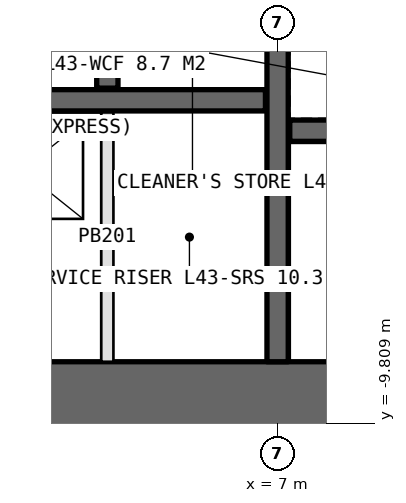
"""IFC4 building model, lengths in metres.
Left out: names, types, materials, properties, quantities, classifications, styles, units other than length and angle.
Written with IfcOpenShell. Run it as: python <this file> out.ifc"""

import sys

from ifc_helpers import new_model, si_unit, direction, frame, frame_2d, origin, place, context, subcontext, project, spatial, rectangle, extrude, element, save


model = new_model("IFC4")
c1 = context("Model", 3, precision=1e-05, world=origin(), true_north=direction((0.0, 1.0)))
c2 = subcontext(c1, "Body", "Model", "MODEL_VIEW")
j1 = project(units=[si_unit("LENGTHUNIT", "METRE"), si_unit("PLANEANGLEUNIT", "RADIAN")], contexts=[c1])
p1 = place(None, origin())
s1 = spatial("IfcSite", under=j1, at=p1, CompositionType="ELEMENT")
p2 = place(p1, origin())
s2 = spatial("IfcBuilding", under=s1, at=p2, CompositionType="ELEMENT")
p3 = place(p2, frame((0.0, 0.0, 199.0)))
s3 = spatial("IfcBuildingStorey", under=s2, at=p3, CompositionType="ELEMENT", Elevation=199.0)
p4 = place(p3, frame((-14.0, -9.4, 0.0), z_axis=(0.0, 0.0, 1.0), x_axis=(1.0, 0.0, 0.0)))
e1 = element("IfcWall", 1, at=p4, inside=s3, PredefinedType="SHEAR", context=c2, shape_type="SweptSolid", body=[
    extrude(rectangle(XDim=28.0, YDim=1.2, at=frame_2d((14.0, 0.0))), origin(), (0.0, 0.0, 1.0), 4.2),
])
p5 = place(p4, frame((22.9, 0.0, 0.0)))
e2 = element("IfcOpeningElement", 2, at=p5, cuts=e1, PredefinedType="OPENING", context=c2, shape_type="SweptSolid", body=[
    extrude(rectangle(XDim=2.2, YDim=2.7, at=frame_2d((1.1, 1.35))), frame((0.0, 0.61, 0.0), z_axis=(0.0, -1.0, 0.0), x_axis=(1.0, 0.0, 0.0)), (0.0, 0.0, 1.0), 1.22),
])
p6 = place(p3, frame((7.0, -8.8, 0.0), z_axis=(0.0, 0.0, 1.0), x_axis=(0.0, 1.0, 0.0)))
e3 = element("IfcWall", 3, at=p6, inside=s3, PredefinedType="SHEAR", context=c2, shape_type="SweptSolid", body=[
    extrude(rectangle(XDim=17.6, YDim=0.35, at=frame_2d((8.8, 0.0))), origin(), (0.0, 0.0, 1.0), 4.2),
])
p7 = place(p6, frame((7.9, 0.0, 0.0)))
e4 = element("IfcOpeningElement", 4, at=p7, cuts=e3, PredefinedType="OPENING", context=c2, shape_type="SweptSolid", body=[
    extrude(rectangle(XDim=1.8, YDim=2.4, at=frame_2d((0.9, 1.2))), frame((0.0, 0.185, 0.0), z_axis=(0.0, -1.0, 0.0), x_axis=(1.0, 0.0, 0.0)), (0.0, 0.0, 1.0), 0.37),
])
p8 = place(p3, frame((-6.8, -4.5, 0.0), z_axis=(0.0, 0.0, 1.0), x_axis=(1.0, 0.0, 0.0)))
e5 = element("IfcWall", 5, at=p8, inside=s3, PredefinedType="SHEAR", context=c2, shape_type="SweptSolid", body=[
    extrude(rectangle(XDim=13.6, YDim=0.35, at=frame_2d((6.8, 0.0))), origin(), (0.0, 0.0, 1.0), 4.2),
])
p9 = place(p3, frame((7.2, -5.0, 0.0), z_axis=(0.0, 0.0, 1.0), x_axis=(1.0, 0.0, 0.0)))
e6 = element("IfcWall", 6, at=p9, inside=s3, PredefinedType="SHEAR", context=c2, shape_type="SweptSolid", body=[
    extrude(rectangle(XDim=5.6, YDim=0.35, at=frame_2d((2.8, 0.0))), origin(), (0.0, 0.0, 1.0), 4.2),
])
p10 = place(p3, frame((4.2, -4.3, 0.0), z_axis=(0.0, 0.0, 1.0), x_axis=(0.0, 1.0, 0.0)))
e7 = element("IfcWall", 7, at=p10, inside=s3, PredefinedType="SHEAR", context=c2, shape_type="SweptSolid", body=[
    extrude(rectangle(XDim=2.5, YDim=0.35, at=frame_2d((1.25, 0.0))), origin(), (0.0, 0.0, 1.0), 4.2),
])
p11 = place(p3, frame((4.2, -4.7, 0.0), z_axis=(0.0, 0.0, 1.0), x_axis=(0.0, -1.0, 0.0)))
e8 = element("IfcWall", 8, at=p11, inside=s3, PredefinedType="PARTITIONING", context=c2, shape_type="SweptSolid", body=[
    extrude(rectangle(XDim=4.1, YDim=0.2, at=frame_2d((2.05, 0.0))), origin(), (0.0, 0.0, 1.0), 4.2),
])
save(model, sys.argv[1])
